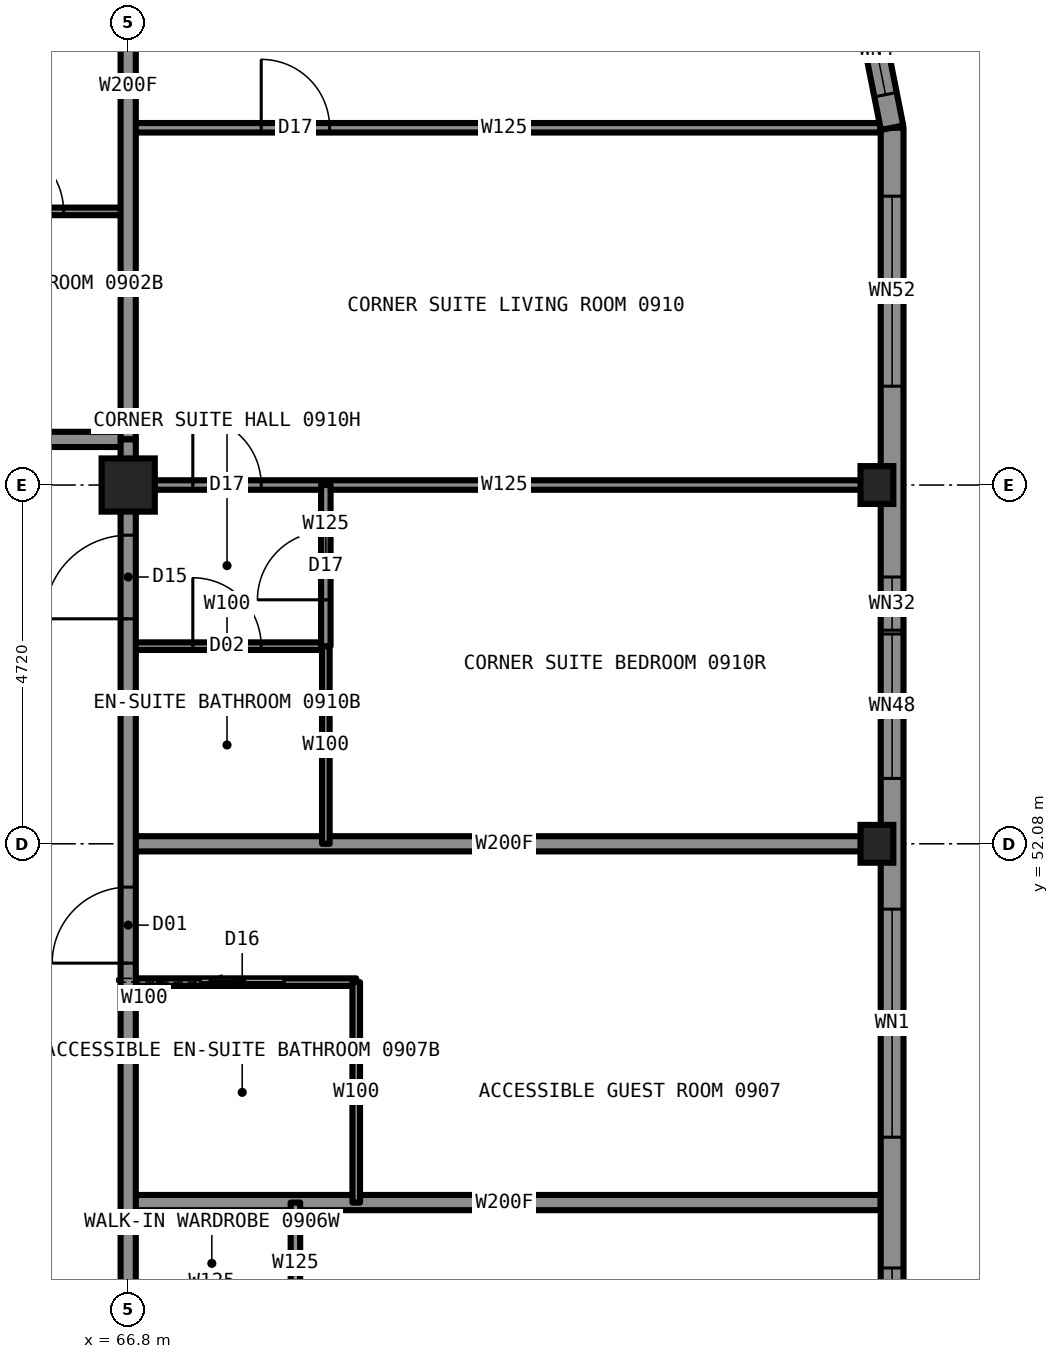
"""IFC4 building model, lengths in metres.
Left out: names, types, materials, properties, quantities, classifications, styles, units other than length and angle.
Written with IfcOpenShell. Run it as: python <this file> out.ifc"""

import sys

from ifc_helpers import new_model, si_unit, direction, frame, frame_2d, origin, origin_2d, place, context, subcontext, project, spatial, rectangle, hollow_rectangle, i_section, extrude, element, fill, save


model = new_model("IFC4")
c1 = context("Model", 3, precision=1e-05, world=origin(), true_north=direction((0.0, 1.0)))
c2 = subcontext(c1, "Body", "Model", "MODEL_VIEW")
j1 = project(units=[si_unit("LENGTHUNIT", "METRE"), si_unit("PLANEANGLEUNIT", "RADIAN")], contexts=[c1])
p1 = place(None, origin())
s1 = spatial("IfcSite", under=j1, at=p1, CompositionType="ELEMENT")
p2 = place(p1, origin())
s2 = spatial("IfcBuilding", under=s1, at=p2, CompositionType="ELEMENT")
p3 = place(p2, frame((0.0, 0.0, 39.0)))
s3 = spatial("IfcBuildingStorey", under=s2, at=p3, CompositionType="ELEMENT", Elevation=39.0)
for number, where, z_axis, x_axis in (
    (1, (76.65, 52.08, 0.0), (0.0, 0.0, 1.0), (1.0, 0.0, 0.0)),
    (2, (76.65, 56.8, 0.0), (0.0, 0.0, 1.0), (1.0, 0.0, 0.0)),
):
    element("IfcColumn", number, at=place(p3, frame(where, z_axis=z_axis, x_axis=x_axis)), inside=s3, PredefinedType="COLUMN", context=c2, shape_type="SweptSolid", body=[
        extrude(i_section(OverallWidth=0.432, OverallDepth=0.498, WebThickness=0.056, FlangeThickness=0.089, at=origin_2d()), origin(), (0.0, 0.0, 1.0), 3.5),
    ])
p4 = place(p3, frame((66.8, 56.8, 0.0), z_axis=(0.0, 0.0, 1.0), x_axis=(1.0, 0.0, 0.0)))
e3 = element("IfcColumn", 3, at=p4, inside=s3, PredefinedType="COLUMN", context=c2, shape_type="SweptSolid", body=[
    extrude(hollow_rectangle(XDim=0.7, YDim=0.7, WallThickness=0.06, at=origin_2d()), origin(), (0.0, 0.0, 1.0), 3.5),
])
p5 = place(p3, frame((66.8, 56.8, 0.0), z_axis=(0.0, 0.0, 1.0), x_axis=(1.0, 0.0, 0.0)))
e4 = element("IfcWall", 4, at=p5, inside=s3, PredefinedType="PARTITIONING", context=c2, shape_type="SweptSolid", body=[
    extrude(rectangle(XDim=9.9, YDim=0.125, at=frame_2d((4.95, 0.0))), origin(), (0.0, 0.0, 1.0), 2.573),
])
p6 = place(p5, frame((0.85, 0.0, 0.0)))
e5 = element("IfcOpeningElement", 5, at=p6, cuts=e4, PredefinedType="OPENING", context=c2, shape_type="SweptSolid", body=[
    extrude(rectangle(XDim=0.9, YDim=2.2, at=frame_2d((0.45, 1.1))), frame((0.0, 0.073, 0.0), z_axis=(0.0, -1.0, 0.0), x_axis=(1.0, 0.0, 0.0)), (0.0, 0.0, 1.0), 0.145),
])
p7 = place(p3, frame((43.2, 57.4, 0.0), z_axis=(0.0, 0.0, 1.0), x_axis=(1.0, 0.0, 0.0)))
e6 = element("IfcWall", 6, at=p7, inside=s3, PredefinedType="PARTITIONING", context=c2, shape_type="SweptSolid", body=[
    extrude(rectangle(XDim=23.6, YDim=0.2, at=frame_2d((11.8, 0.0))), origin(), (0.0, 0.0, 1.0), 3.33),
])
p8 = place(p7, frame((3.0, 0.0, 0.0)))
e7 = element("IfcOpeningElement", 7, at=p8, cuts=e6, PredefinedType="OPENING", context=c2, shape_type="SweptSolid", body=[
    extrude(rectangle(XDim=1.0, YDim=2.2, at=frame_2d((0.5, 1.1))), frame((0.0, 0.11, 0.0), z_axis=(0.0, -1.0, 0.0), x_axis=(1.0, 0.0, 0.0)), (0.0, 0.0, 1.0), 0.22),
])
p9 = place(p7, frame((11.29, 0.0, 0.0)))
e8 = element("IfcOpeningElement", 8, at=p9, cuts=e6, PredefinedType="OPENING", context=c2, shape_type="SweptSolid", body=[
    extrude(rectangle(XDim=1.1, YDim=2.2, at=frame_2d((0.55, 1.1))), frame((0.0, 0.11, 0.0), z_axis=(0.0, -1.0, 0.0), x_axis=(1.0, 0.0, 0.0)), (0.0, 0.0, 1.0), 0.22),
])
p10 = place(p3, frame((64.2, 60.4, 0.0), z_axis=(0.0, 0.0, 1.0), x_axis=(1.0, 0.0, 0.0)))
e9 = element("IfcWall", 9, at=p10, inside=s3, PredefinedType="PARTITIONING", context=c2, shape_type="SweptSolid", body=[
    extrude(rectangle(XDim=2.6, YDim=0.1, at=frame_2d((1.3, 0.0))), origin(), (0.0, 0.0, 1.0), 3.33),
])
p11 = place(p10, frame((0.85, 0.0, 0.0)))
e10 = element("IfcOpeningElement", 10, at=p11, cuts=e9, PredefinedType="OPENING", context=c2, shape_type="SweptSolid", body=[
    extrude(rectangle(XDim=0.9, YDim=2.1, at=frame_2d((0.45, 1.05))), frame((0.0, 0.06, 0.0), z_axis=(0.0, -1.0, 0.0), x_axis=(1.0, 0.0, 0.0)), (0.0, 0.0, 1.0), 0.12),
])
p12 = place(p3, frame((66.8, 61.5, 0.0), z_axis=(0.0, 0.0, 1.0), x_axis=(1.0, 0.0, 0.0)))
e11 = element("IfcWall", 11, at=p12, inside=s3, PredefinedType="PARTITIONING", context=c2, shape_type="SweptSolid", body=[
    extrude(rectangle(XDim=9.894, YDim=0.125, at=frame_2d((4.947, 0.0))), origin(), (0.0, 0.0, 1.0), 3.33),
])
p13 = place(p12, frame((1.75, 0.0, 0.0)))
e12 = element("IfcOpeningElement", 12, at=p13, cuts=e11, PredefinedType="OPENING", context=c2, shape_type="SweptSolid", body=[
    extrude(rectangle(XDim=0.9, YDim=2.2, at=frame_2d((0.45, 1.1))), frame((0.0, 0.073, 0.0), z_axis=(0.0, -1.0, 0.0), x_axis=(1.0, 0.0, 0.0)), (0.0, 0.0, 1.0), 0.145),
])
p14 = place(p3, frame((66.8, 47.36, 0.0), z_axis=(0.0, 0.0, 1.0), x_axis=(1.0, 0.0, 0.0)))
e13 = element("IfcWall", 13, at=p14, inside=s3, PredefinedType="PARTITIONING", context=c2, shape_type="SweptSolid", body=[
    extrude(rectangle(XDim=9.9, YDim=0.2, at=frame_2d((4.95, 0.0))), origin(), (0.0, 0.0, 1.0), 2.723),
])
p15 = place(p3, frame((66.8, 50.26, 0.0), z_axis=(0.0, 0.0, 1.0), x_axis=(1.0, 0.0, 0.0)))
e14 = element("IfcWall", 14, at=p15, inside=s3, PredefinedType="PARTITIONING", context=c2, shape_type="SweptSolid", body=[
    extrude(rectangle(XDim=3.0, YDim=0.1, at=frame_2d((1.5, 0.0))), origin(), (0.0, 0.0, 1.0), 3.33),
])
p16 = place(p15, frame((0.95, 0.0, 0.0)))
e15 = element("IfcOpeningElement", 15, at=p16, cuts=e14, PredefinedType="OPENING", context=c2, shape_type="SweptSolid", body=[
    extrude(rectangle(XDim=1.1, YDim=2.1, at=frame_2d((0.55, 1.05))), frame((0.0, 0.06, 0.0), z_axis=(0.0, -1.0, 0.0), x_axis=(1.0, 0.0, 0.0)), (0.0, 0.0, 1.0), 0.12),
])
p17 = place(p3, frame((66.8, 52.08, 0.0), z_axis=(0.0, 0.0, 1.0), x_axis=(1.0, 0.0, 0.0)))
e16 = element("IfcWall", 16, at=p17, inside=s3, PredefinedType="PARTITIONING", context=c2, shape_type="SweptSolid", body=[
    extrude(rectangle(XDim=9.9, YDim=0.2, at=frame_2d((4.95, 0.0))), origin(), (0.0, 0.0, 1.0), 2.573),
])
p18 = place(p3, frame((66.8, 54.68, 0.0), z_axis=(0.0, 0.0, 1.0), x_axis=(1.0, 0.0, 0.0)))
e17 = element("IfcWall", 17, at=p18, inside=s3, PredefinedType="PARTITIONING", context=c2, shape_type="SweptSolid", body=[
    extrude(rectangle(XDim=2.6, YDim=0.1, at=frame_2d((1.3, 0.0))), origin(), (0.0, 0.0, 1.0), 3.33),
])
p19 = place(p18, frame((0.85, 0.0, 0.0)))
e18 = element("IfcOpeningElement", 18, at=p19, cuts=e17, PredefinedType="OPENING", context=c2, shape_type="SweptSolid", body=[
    extrude(rectangle(XDim=0.9, YDim=2.1, at=frame_2d((0.45, 1.05))), frame((0.0, 0.06, 0.0), z_axis=(0.0, -1.0, 0.0), x_axis=(1.0, 0.0, 0.0)), (0.0, 0.0, 1.0), 0.12),
])
p20 = place(p3, frame((66.8, 33.2, 0.0), z_axis=(0.0, 0.0, 1.0), x_axis=(0.0, 1.0, 0.0)))
e19 = element("IfcWall", 19, at=p20, inside=s3, PredefinedType="PARTITIONING", context=c2, shape_type="SweptSolid", body=[
    extrude(rectangle(XDim=23.58, YDim=0.2, at=frame_2d((11.79, 0.0))), origin(), (0.0, 0.0, 1.0), 3.33),
])
p21 = place(p20, frame((7.72, 0.0, 0.0)))
e20 = element("IfcOpeningElement", 20, at=p21, cuts=e19, PredefinedType="OPENING", context=c2, shape_type="SweptSolid", body=[
    extrude(rectangle(XDim=1.0, YDim=2.2, at=frame_2d((0.5, 1.1))), frame((0.0, 0.11, 0.0), z_axis=(0.0, -1.0, 0.0), x_axis=(1.0, 0.0, 0.0)), (0.0, 0.0, 1.0), 0.22),
])
p22 = place(p20, frame((17.31, 0.0, 0.0)))
e21 = element("IfcOpeningElement", 21, at=p22, cuts=e19, PredefinedType="OPENING", context=c2, shape_type="SweptSolid", body=[
    extrude(rectangle(XDim=1.0, YDim=2.2, at=frame_2d((0.5, 1.1))), frame((0.0, 0.11, 0.0), z_axis=(0.0, -1.0, 0.0), x_axis=(1.0, 0.0, 0.0)), (0.0, 0.0, 1.0), 0.22),
])
p23 = place(p20, frame((21.84, 0.0, 0.0)))
e22 = element("IfcOpeningElement", 22, at=p23, cuts=e19, PredefinedType="OPENING", context=c2, shape_type="SweptSolid", body=[
    extrude(rectangle(XDim=1.1, YDim=2.2, at=frame_2d((0.55, 1.1))), frame((0.0, 0.11, 0.0), z_axis=(0.0, -1.0, 0.0), x_axis=(1.0, 0.0, 0.0)), (0.0, 0.0, 1.0), 0.22),
])
p24 = place(p20, frame((0.66, 0.0, 0.0)))
e23 = element("IfcOpeningElement", 23, at=p24, cuts=e19, PredefinedType="OPENING", context=c2, shape_type="SweptSolid", body=[
    extrude(rectangle(XDim=1.1, YDim=2.2, at=frame_2d((0.55, 1.1))), frame((0.0, 0.11, 0.0), z_axis=(0.0, -1.0, 0.0), x_axis=(1.0, 0.0, 0.0)), (0.0, 0.0, 1.0), 0.22),
])
p25 = place(p3, frame((66.8, 57.4, 0.0), z_axis=(0.0, 0.0, 1.0), x_axis=(0.0, 1.0, 0.0)))
e24 = element("IfcWall", 24, at=p25, inside=s3, PredefinedType="PARTITIONING", context=c2, shape_type="SweptSolid", body=[
    extrude(rectangle(XDim=9.3, YDim=0.2, at=frame_2d((4.65, 0.0))), origin(), (0.0, 0.0, 1.0), 2.573),
])
p26 = place(p3, frame((69.0, 45.76, 0.0), z_axis=(0.0, 0.0, 1.0), x_axis=(0.0, 1.0, 0.0)))
e25 = element("IfcWall", 25, at=p26, inside=s3, PredefinedType="PARTITIONING", context=c2, shape_type="SweptSolid", body=[
    extrude(rectangle(XDim=1.6, YDim=0.125, at=frame_2d((0.8, 0.0))), origin(), (0.0, 0.0, 1.0), 3.33),
])
p27 = place(p3, frame((69.4, 52.08, 0.0), z_axis=(0.0, 0.0, 1.0), x_axis=(0.0, 1.0, 0.0)))
e26 = element("IfcWall", 26, at=p27, inside=s3, PredefinedType="PARTITIONING", context=c2, shape_type="SweptSolid", body=[
    extrude(rectangle(XDim=2.6, YDim=0.1, at=frame_2d((1.3, 0.0))), origin(), (0.0, 0.0, 1.0), 3.33),
])
p28 = place(p3, frame((69.4, 54.68, 0.0), z_axis=(0.0, 0.0, 1.0), x_axis=(0.0, 1.0, 0.0)))
e27 = element("IfcWall", 27, at=p28, inside=s3, PredefinedType="PARTITIONING", context=c2, shape_type="SweptSolid", body=[
    extrude(rectangle(XDim=2.12, YDim=0.125, at=frame_2d((1.06, 0.0))), origin(), (0.0, 0.0, 1.0), 3.33),
])
p29 = place(p28, frame((0.61, 0.0, 0.0)))
e28 = element("IfcOpeningElement", 28, at=p29, cuts=e27, PredefinedType="OPENING", context=c2, shape_type="SweptSolid", body=[
    extrude(rectangle(XDim=0.9, YDim=2.2, at=frame_2d((0.45, 1.1))), frame((0.0, 0.073, 0.0), z_axis=(0.0, -1.0, 0.0), x_axis=(1.0, 0.0, 0.0)), (0.0, 0.0, 1.0), 0.145),
])
p30 = place(p3, frame((69.8, 47.36, 0.0), z_axis=(0.0, 0.0, 1.0), x_axis=(0.0, 1.0, 0.0)))
e29 = element("IfcWall", 29, at=p30, inside=s3, PredefinedType="PARTITIONING", context=c2, shape_type="SweptSolid", body=[
    extrude(rectangle(XDim=2.9, YDim=0.1, at=frame_2d((1.45, 0.0))), origin(), (0.0, 0.0, 1.0), 3.33),
])
p31 = place(p3, frame((76.85, 28.5, 0.0), z_axis=(0.0, 0.0, 1.0), x_axis=(0.0, 1.0, 0.0)))
e30 = element("IfcWall", 30, at=p31, inside=s3, PredefinedType="SOLIDWALL", context=c2, shape_type="SweptSolid", body=[
    extrude(rectangle(XDim=33.0, YDim=0.3, at=frame_2d((16.5, 0.0))), origin(), (0.0, 0.0, 1.0), 2.83),
])
p32 = place(p31, frame((0.85, 0.0, 0.5)))
e31 = element("IfcOpeningElement", 31, at=p32, cuts=e30, PredefinedType="OPENING", context=c2, shape_type="SweptSolid", body=[
    extrude(rectangle(XDim=2.5, YDim=2.0, at=frame_2d((1.25, 1.0))), frame((0.0, 0.16, 0.0), z_axis=(0.0, -1.0, 0.0), x_axis=(1.0, 0.0, 0.0)), (0.0, 0.0, 1.0), 0.32),
])
p33 = place(p31, frame((6.61, 0.0, 0.5)))
e32 = element("IfcOpeningElement", 32, at=p33, cuts=e30, PredefinedType="OPENING", context=c2, shape_type="SweptSolid", body=[
    extrude(rectangle(XDim=1.9, YDim=1.9, at=frame_2d((0.95, 0.95))), frame((0.0, 0.16, 0.0), z_axis=(0.0, -1.0, 0.0), x_axis=(1.0, 0.0, 0.0)), (0.0, 0.0, 1.0), 0.32),
])
p34 = place(p31, frame((10.28, 0.0, 0.5)))
e33 = element("IfcOpeningElement", 33, at=p34, cuts=e30, PredefinedType="OPENING", context=c2, shape_type="SweptSolid", body=[
    extrude(rectangle(XDim=3.0, YDim=2.0, at=frame_2d((1.5, 1.0))), frame((0.0, 0.16, 0.0), z_axis=(0.0, -1.0, 0.0), x_axis=(1.0, 0.0, 0.0)), (0.0, 0.0, 1.0), 0.32),
])
p35 = place(p31, frame((15.0, 0.0, 0.5)))
e34 = element("IfcOpeningElement", 34, at=p35, cuts=e30, PredefinedType="OPENING", context=c2, shape_type="SweptSolid", body=[
    extrude(rectangle(XDim=3.0, YDim=2.0, at=frame_2d((1.5, 1.0))), frame((0.0, 0.16, 0.0), z_axis=(0.0, -1.0, 0.0), x_axis=(1.0, 0.0, 0.0)), (0.0, 0.0, 1.0), 0.32),
])
p36 = place(p31, frame((19.72, 0.0, 0.5)))
e35 = element("IfcOpeningElement", 35, at=p36, cuts=e30, PredefinedType="OPENING", context=c2, shape_type="SweptSolid", body=[
    extrude(rectangle(XDim=3.0, YDim=2.0, at=frame_2d((1.5, 1.0))), frame((0.0, 0.16, 0.0), z_axis=(0.0, -1.0, 0.0), x_axis=(1.0, 0.0, 0.0)), (0.0, 0.0, 1.0), 0.32),
])
p37 = place(p31, frame((24.44, 0.0, 0.5)))
e36 = element("IfcOpeningElement", 36, at=p37, cuts=e30, PredefinedType="OPENING", context=c2, shape_type="SweptSolid", body=[
    extrude(rectangle(XDim=1.9, YDim=1.9, at=frame_2d((0.95, 0.95))), frame((0.0, 0.16, 0.0), z_axis=(0.0, -1.0, 0.0), x_axis=(1.0, 0.0, 0.0)), (0.0, 0.0, 1.0), 0.32),
])
p38 = place(p31, frame((29.6, 0.0, 0.5)))
e37 = element("IfcOpeningElement", 37, at=p38, cuts=e30, PredefinedType="OPENING", context=c2, shape_type="SweptSolid", body=[
    extrude(rectangle(XDim=2.5, YDim=2.0, at=frame_2d((1.25, 1.0))), frame((0.0, 0.16, 0.0), z_axis=(0.0, -1.0, 0.0), x_axis=(1.0, 0.0, 0.0)), (0.0, 0.0, 1.0), 0.32),
])
p39 = place(p31, frame((5.91, 0.0, 0.5)))
e38 = element("IfcOpeningElement", 38, at=p39, cuts=e30, PredefinedType="OPENING", context=c2, shape_type="SweptSolid", body=[
    extrude(rectangle(XDim=0.7, YDim=1.0, at=frame_2d((0.35, 0.5))), frame((0.0, 0.16, 0.0), z_axis=(0.0, -1.0, 0.0), x_axis=(1.0, 0.0, 0.0)), (0.0, 0.0, 1.0), 0.32),
])
p40 = place(p31, frame((26.39, 0.0, 0.5)))
e39 = element("IfcOpeningElement", 39, at=p40, cuts=e30, PredefinedType="OPENING", context=c2, shape_type="SweptSolid", body=[
    extrude(rectangle(XDim=0.7, YDim=1.0, at=frame_2d((0.35, 0.5))), frame((0.0, 0.16, 0.0), z_axis=(0.0, -1.0, 0.0), x_axis=(1.0, 0.0, 0.0)), (0.0, 0.0, 1.0), 0.32),
])
p41 = place(p3, frame((76.85, 61.5, 0.0), z_axis=(0.0, 0.0, 1.0), x_axis=(-0.195081421501, 0.980787050784, 0.0)))
e40 = element("IfcWall", 40, at=p41, inside=s3, PredefinedType="SOLIDWALL", context=c2, shape_type="SweptSolid", body=[
    extrude(rectangle(XDim=2.087, YDim=0.3, at=frame_2d((1.044, 0.0))), origin(), (0.0, 0.0, 1.0), 3.33),
])
p42 = place(p41, frame((0.444, 0.0, 0.5)))
e41 = element("IfcOpeningElement", 41, at=p42, cuts=e40, PredefinedType="OPENING", context=c2, shape_type="SweptSolid", body=[
    extrude(rectangle(XDim=1.2, YDim=2.0, at=frame_2d((0.6, 1.0))), frame((0.0, 0.16, 0.0), z_axis=(0.0, -1.0, 0.0), x_axis=(1.0, 0.0, 0.0)), (0.0, 0.0, 1.0), 0.32),
])
p43 = place(p3, frame((66.8, 56.78, 0.0), z_axis=(0.0, 0.0, 1.0), x_axis=(0.0, 1.0, 0.0)))
e42 = element("IfcWall", 42, at=p43, inside=s3, PredefinedType="PARTITIONING", context=c2, shape_type="SweptSolid", body=[
    extrude(rectangle(XDim=0.62, YDim=0.2, at=frame_2d((0.31, 0.0))), origin(), (0.0, 0.0, 1.0), 2.573),
])
p44 = place(p11, origin())
e43 = element("IfcDoor", 43, at=p44, inside=s3, OperationType="SINGLE_SWING_RIGHT", PredefinedType="DOOR", context=c2, shape_type="SweptSolid", body=[
    extrude(rectangle(XDim=0.9, YDim=2.1, at=frame_2d((0.45, 1.05))), frame((0.0, 0.025, 0.0), z_axis=(0.0, -1.0, 0.0), x_axis=(1.0, 0.0, 0.0)), (0.0, 0.0, 1.0), 0.05),
])
fill(e10, e43)
p45 = place(p22, origin())
e44 = element("IfcDoor", 44, at=p45, inside=s3, OperationType="SINGLE_SWING_LEFT", PredefinedType="DOOR", context=c2, shape_type="SweptSolid", body=[
    extrude(rectangle(XDim=1.0, YDim=2.2, at=frame_2d((0.5, 1.1))), frame((0.0, 0.025, 0.0), z_axis=(0.0, -1.0, 0.0), x_axis=(1.0, 0.0, 0.0)), (0.0, 0.0, 1.0), 0.05),
])
fill(e21, e44)
p46 = place(p16, origin())
e45 = element("IfcDoor", 45, at=p46, inside=s3, OperationType="SLIDING_TO_LEFT", PredefinedType="DOOR", context=c2, shape_type="SweptSolid", body=[
    extrude(rectangle(XDim=1.1, YDim=2.1, at=frame_2d((0.55, 1.05))), frame((0.0, 0.025, 0.0), z_axis=(0.0, -1.0, 0.0), x_axis=(1.0, 0.0, 0.0)), (0.0, 0.0, 1.0), 0.05),
])
fill(e15, e45)
p47 = place(p6, origin())
e46 = element("IfcDoor", 46, at=p47, inside=s3, OperationType="SINGLE_SWING_LEFT", PredefinedType="DOOR", context=c2, shape_type="SweptSolid", body=[
    extrude(rectangle(XDim=0.9, YDim=2.2, at=frame_2d((0.45, 1.1))), frame((0.0, 0.025, 0.0), z_axis=(0.0, -1.0, 0.0), x_axis=(1.0, 0.0, 0.0)), (0.0, 0.0, 1.0), 0.05),
])
fill(e5, e46)
p48 = place(p19, origin())
e47 = element("IfcDoor", 47, at=p48, inside=s3, OperationType="SINGLE_SWING_RIGHT", PredefinedType="DOOR", context=c2, shape_type="SweptSolid", body=[
    extrude(rectangle(XDim=0.9, YDim=2.1, at=frame_2d((0.45, 1.05))), frame((0.0, 0.025, 0.0), z_axis=(0.0, -1.0, 0.0), x_axis=(1.0, 0.0, 0.0)), (0.0, 0.0, 1.0), 0.05),
])
fill(e18, e47)
p49 = place(p23, origin())
e48 = element("IfcDoor", 48, at=p49, inside=s3, OperationType="SINGLE_SWING_LEFT", PredefinedType="DOOR", context=c2, shape_type="SweptSolid", body=[
    extrude(rectangle(XDim=1.1, YDim=2.2, at=frame_2d((0.55, 1.1))), frame((0.0, 0.025, 0.0), z_axis=(0.0, -1.0, 0.0), x_axis=(1.0, 0.0, 0.0)), (0.0, 0.0, 1.0), 0.05),
])
fill(e22, e48)
p50 = place(p13, origin())
e49 = element("IfcDoor", 49, at=p50, inside=s3, OperationType="SINGLE_SWING_LEFT", PredefinedType="DOOR", context=c2, shape_type="SweptSolid", body=[
    extrude(rectangle(XDim=0.9, YDim=2.2, at=frame_2d((0.45, 1.1))), frame((0.0, 0.025, 0.0), z_axis=(0.0, -1.0, 0.0), x_axis=(1.0, 0.0, 0.0)), (0.0, 0.0, 1.0), 0.05),
])
fill(e12, e49)
p51 = place(p29, origin())
e50 = element("IfcDoor", 50, at=p51, inside=s3, OperationType="SINGLE_SWING_LEFT", PredefinedType="DOOR", context=c2, shape_type="SweptSolid", body=[
    extrude(rectangle(XDim=0.9, YDim=2.2, at=frame_2d((0.45, 1.1))), frame((0.0, 0.025, 0.0), z_axis=(0.0, -1.0, 0.0), x_axis=(1.0, 0.0, 0.0)), (0.0, 0.0, 1.0), 0.05),
])
fill(e28, e50)
p52 = place(p35, origin())
e51 = element("IfcWindow", 51, at=p52, inside=s3, PartitioningType="SINGLE_PANEL", PredefinedType="WINDOW", context=c2, shape_type="SweptSolid", body=[
    extrude(rectangle(XDim=3.0, YDim=2.0, at=frame_2d((1.5, 1.0))), frame((0.0, 0.03, 0.0), z_axis=(0.0, -1.0, 0.0), x_axis=(1.0, 0.0, 0.0)), (0.0, 0.0, 1.0), 0.06),
])
fill(e34, e51)
p53 = place(p36, origin())
e52 = element("IfcWindow", 52, at=p53, inside=s3, PartitioningType="SINGLE_PANEL", PredefinedType="WINDOW", context=c2, shape_type="SweptSolid", body=[
    extrude(rectangle(XDim=3.0, YDim=2.0, at=frame_2d((1.5, 1.0))), frame((0.0, 0.03, 0.0), z_axis=(0.0, -1.0, 0.0), x_axis=(1.0, 0.0, 0.0)), (0.0, 0.0, 1.0), 0.06),
])
fill(e35, e52)
p54 = place(p37, origin())
e53 = element("IfcWindow", 53, at=p54, inside=s3, PartitioningType="SINGLE_PANEL", PredefinedType="WINDOW", context=c2, shape_type="SweptSolid", body=[
    extrude(rectangle(XDim=1.9, YDim=1.9, at=frame_2d((0.95, 0.95))), frame((0.0, 0.03, 0.0), z_axis=(0.0, -1.0, 0.0), x_axis=(1.0, 0.0, 0.0)), (0.0, 0.0, 1.0), 0.06),
])
fill(e36, e53)
p55 = place(p38, origin())
e54 = element("IfcWindow", 54, at=p55, inside=s3, PartitioningType="SINGLE_PANEL", PredefinedType="WINDOW", context=c2, shape_type="SweptSolid", body=[
    extrude(rectangle(XDim=2.5, YDim=2.0, at=frame_2d((1.25, 1.0))), frame((0.0, 0.03, 0.0), z_axis=(0.0, -1.0, 0.0), x_axis=(1.0, 0.0, 0.0)), (0.0, 0.0, 1.0), 0.06),
])
fill(e37, e54)
p56 = place(p42, origin())
e55 = element("IfcWindow", 55, at=p56, inside=s3, PartitioningType="SINGLE_PANEL", PredefinedType="WINDOW", context=c2, shape_type="SweptSolid", body=[
    extrude(rectangle(XDim=1.2, YDim=2.0, at=frame_2d((0.6, 1.0))), frame((0.0, 0.03, 0.0), z_axis=(0.0, -1.0, 0.0), x_axis=(1.0, 0.0, 0.0)), (0.0, 0.0, 1.0), 0.06),
])
fill(e41, e55)
p57 = place(p40, origin())
e56 = element("IfcWindow", 56, at=p57, inside=s3, PartitioningType="SINGLE_PANEL", PredefinedType="WINDOW", context=c2, shape_type="SweptSolid", body=[
    extrude(rectangle(XDim=0.7, YDim=1.0, at=frame_2d((0.35, 0.5))), frame((0.0, 0.03, 0.0), z_axis=(0.0, -1.0, 0.0), x_axis=(1.0, 0.0, 0.0)), (0.0, 0.0, 1.0), 0.06),
])
fill(e39, e56)
save(model, sys.argv[1])
